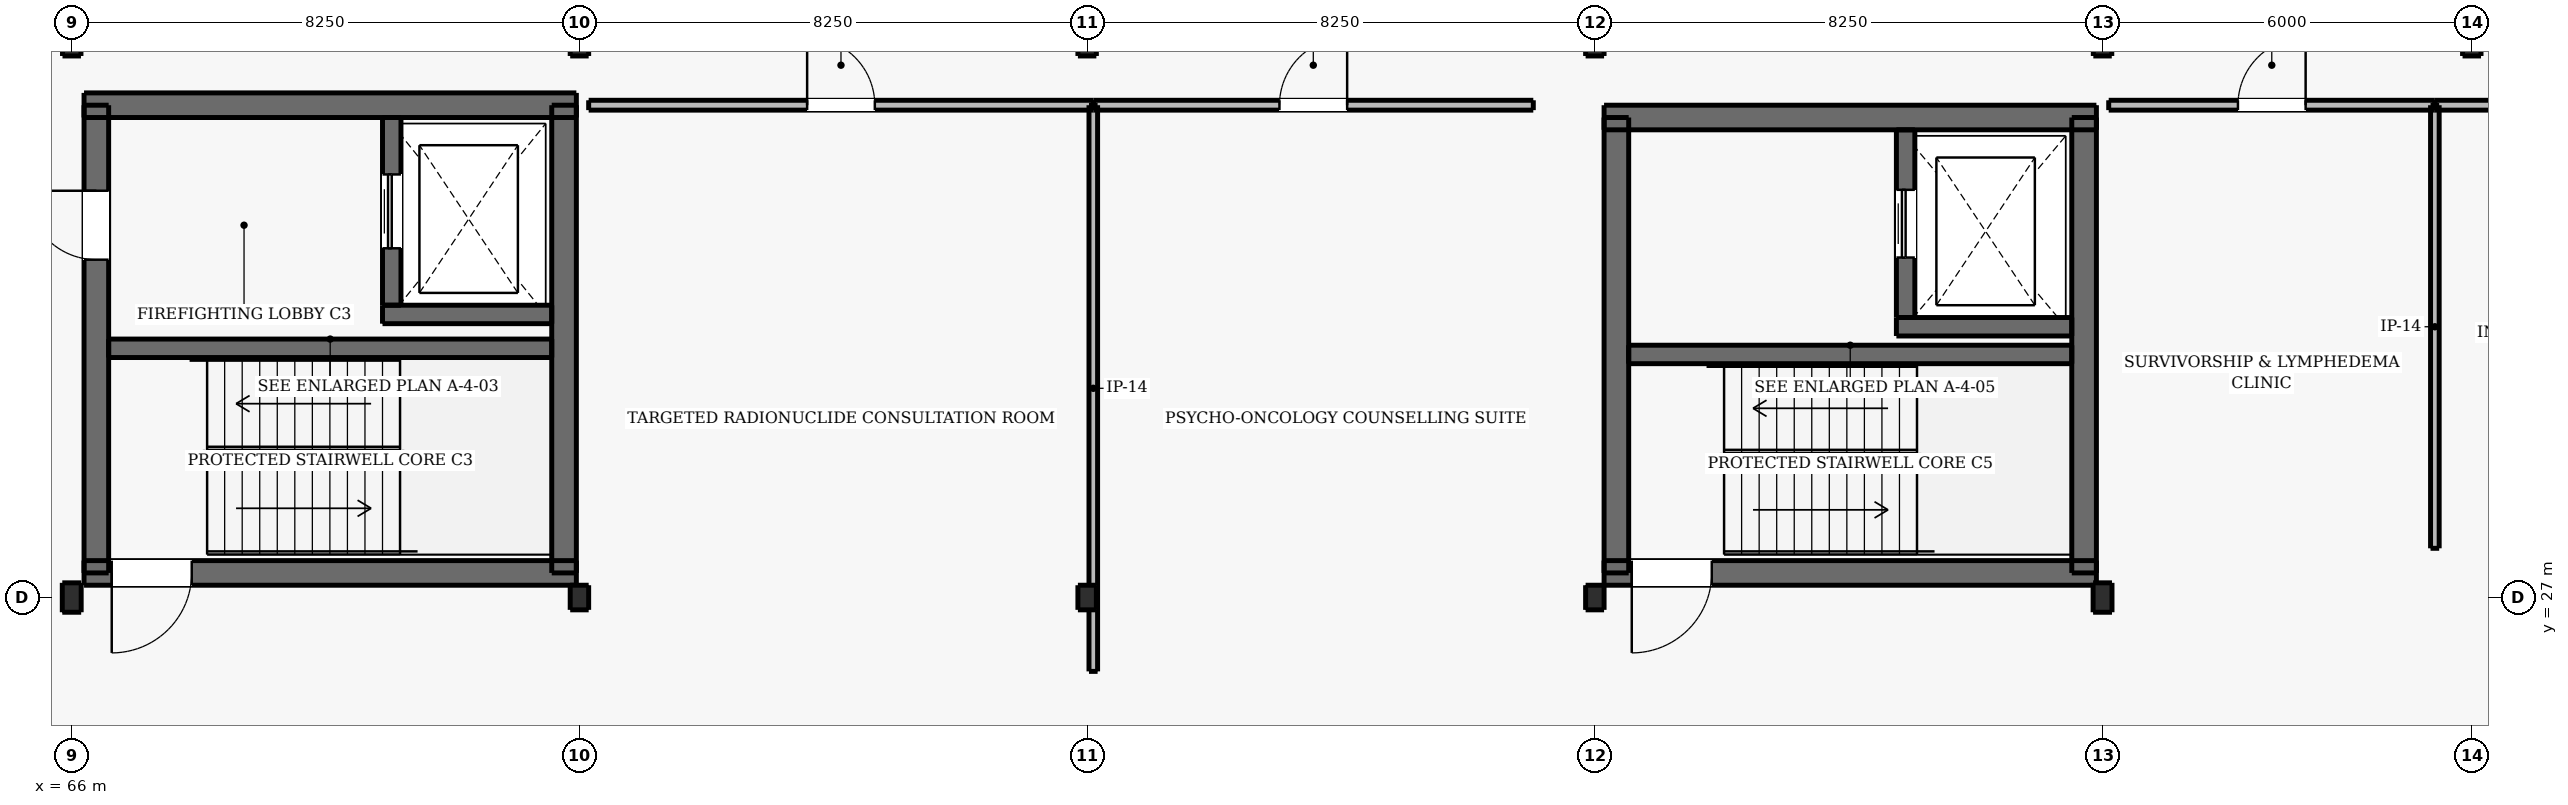
"""IFC4 building model, lengths in metres.
Left out: names, types, materials, properties, quantities, classifications, styles, units other than length and angle.
Written with IfcOpenShell. Run it as: python <this file> out.ifc"""

import sys

from ifc_helpers import new_model, si_unit, direction, frame, frame_2d, origin, origin_2d, place, context, subcontext, project, spatial, rectangle, i_section, extrude, element, fill, save


model = new_model("IFC4")
c1 = context("Model", 3, precision=1e-05, world=origin(), true_north=direction((0.0, 1.0)))
c2 = subcontext(c1, "Body", "Model", "MODEL_VIEW")
j1 = project(units=[si_unit("LENGTHUNIT", "METRE"), si_unit("PLANEANGLEUNIT", "RADIAN")], contexts=[c1])
p1 = place(None, origin())
s1 = spatial("IfcSite", under=j1, at=p1, CompositionType="ELEMENT")
p2 = place(p1, origin())
s2 = spatial("IfcBuilding", under=s1, at=p2, CompositionType="ELEMENT")
p3 = place(p2, frame((0.0, 0.0, 9.6)))
s3 = spatial("IfcBuildingStorey", under=s2, at=p3, CompositionType="ELEMENT", Elevation=9.6)
p4 = place(p3, frame((66.0, 27.0, 0.0), z_axis=(0.0, 0.0, 1.0), x_axis=(1.0, 0.0, 0.0)))
e1 = element("IfcColumn", 1, at=p4, inside=s3, PredefinedType="COLUMN", context=c2, shape_type="SweptSolid", body=[
    extrude(i_section(OverallWidth=0.307, OverallDepth=0.478, WebThickness=0.021, FlangeThickness=0.04, FilletRadius=0.027, at=origin_2d()), origin(), (0.0, 0.0, 1.0), 4.2),
])
for number, where, z_axis, x_axis in (
    (2, (66.0, 36.0, 0.0), (0.0, 0.0, 1.0), (1.0, 0.0, 0.0)),
    (3, (74.25, 27.0, 0.0), (0.0, 0.0, 1.0), (1.0, 0.0, 0.0)),
    (4, (74.25, 36.0, 0.0), (0.0, 0.0, 1.0), (1.0, 0.0, 0.0)),
    (5, (82.5, 27.0, 0.0), (0.0, 0.0, 1.0), (1.0, 0.0, 0.0)),
    (6, (82.5, 36.0, 0.0), (0.0, 0.0, 1.0), (1.0, 0.0, 0.0)),
    (7, (90.75, 27.0, 0.0), (0.0, 0.0, 1.0), (1.0, 0.0, 0.0)),
    (8, (90.75, 36.0, 0.0), (0.0, 0.0, 1.0), (1.0, 0.0, 0.0)),
):
    element("IfcColumn", number, at=place(p3, frame(where, z_axis=z_axis, x_axis=x_axis)), inside=s3, PredefinedType="COLUMN", context=c2, shape_type="SweptSolid", body=[
        extrude(i_section(OverallWidth=0.3, OverallDepth=0.4, WebThickness=0.013, FlangeThickness=0.024, FilletRadius=0.027, at=origin_2d()), origin(), (0.0, 0.0, 1.0), 4.2),
    ])
p5 = place(p3, frame((99.0, 27.0, 0.0), z_axis=(0.0, 0.0, 1.0), x_axis=(1.0, 0.0, 0.0)))
e9 = element("IfcColumn", 9, at=p5, inside=s3, PredefinedType="COLUMN", context=c2, shape_type="SweptSolid", body=[
    extrude(i_section(OverallWidth=0.307, OverallDepth=0.478, WebThickness=0.021, FlangeThickness=0.04, FilletRadius=0.027, at=origin_2d()), origin(), (0.0, 0.0, 1.0), 4.2),
])
for number, where, z_axis, x_axis in (
    (10, (99.0, 36.0, 0.0), (0.0, 0.0, 1.0), (1.0, 0.0, 0.0)),
    (11, (105.0, 36.0, 0.0), (0.0, 0.0, 1.0), (1.0, 0.0, 0.0)),
):
    element("IfcColumn", number, at=place(p3, frame(where, z_axis=z_axis, x_axis=x_axis)), inside=s3, PredefinedType="COLUMN", context=c2, shape_type="SweptSolid", body=[
        extrude(i_section(OverallWidth=0.3, OverallDepth=0.4, WebThickness=0.013, FlangeThickness=0.024, FilletRadius=0.027, at=origin_2d()), origin(), (0.0, 0.0, 1.0), 4.2),
    ])
p6 = place(p3, frame((66.2, 27.4, 0.0), z_axis=(0.0, 0.0, 1.0), x_axis=(1.0, 0.0, 0.0)))
e12 = element("IfcWall", 12, at=p6, inside=s3, PredefinedType="SHEAR", context=c2, shape_type="SweptSolid", body=[
    extrude(rectangle(XDim=8.0, YDim=0.4, at=frame_2d((4.0, 0.0))), origin(), (0.0, 0.0, 1.0), 4.2),
])
p7 = place(p6, frame((0.45, 0.0, 0.0)))
e13 = element("IfcOpeningElement", 13, at=p7, cuts=e12, PredefinedType="OPENING", context=c2, shape_type="SweptSolid", body=[
    extrude(rectangle(XDim=1.3, YDim=2.15, at=frame_2d((0.65, 1.075))), frame((0.0, 0.21, 0.0), z_axis=(0.0, -1.0, 0.0), x_axis=(1.0, 0.0, 0.0)), (0.0, 0.0, 1.0), 0.42),
])
p8 = place(p3, frame((66.2, 35.0, 0.0), z_axis=(0.0, 0.0, 1.0), x_axis=(1.0, 0.0, 0.0)))
e14 = element("IfcWall", 14, at=p8, inside=s3, PredefinedType="SHEAR", context=c2, shape_type="SweptSolid", body=[
    extrude(rectangle(XDim=8.0, YDim=0.4, at=frame_2d((4.0, 0.0))), origin(), (0.0, 0.0, 1.0), 4.2),
])
p9 = place(p3, frame((66.4, 27.4, 0.0), z_axis=(0.0, 0.0, 1.0), x_axis=(0.0, 1.0, 0.0)))
e15 = element("IfcWall", 15, at=p9, inside=s3, PredefinedType="SHEAR", context=c2, shape_type="SweptSolid", body=[
    extrude(rectangle(XDim=7.6, YDim=0.4, at=frame_2d((3.8, 0.0))), origin(), (0.0, 0.0, 1.0), 4.2),
])
p10 = place(p9, frame((5.09, 0.0, 0.0)))
e16 = element("IfcOpeningElement", 16, at=p10, cuts=e15, PredefinedType="OPENING", context=c2, shape_type="SweptSolid", body=[
    extrude(rectangle(XDim=1.12, YDim=2.15, at=frame_2d((0.56, 1.075))), frame((0.0, 0.21, 0.0), z_axis=(0.0, -1.0, 0.0), x_axis=(1.0, 0.0, 0.0)), (0.0, 0.0, 1.0), 0.42),
])
p11 = place(p3, frame((74.0, 27.4, 0.0), z_axis=(0.0, 0.0, 1.0), x_axis=(0.0, 1.0, 0.0)))
e17 = element("IfcWall", 17, at=p11, inside=s3, PredefinedType="SHEAR", context=c2, shape_type="SweptSolid", body=[
    extrude(rectangle(XDim=7.6, YDim=0.4, at=frame_2d((3.8, 0.0))), origin(), (0.0, 0.0, 1.0), 4.2),
])
p12 = place(p3, frame((66.6, 31.05, 0.0), z_axis=(0.0, 0.0, 1.0), x_axis=(1.0, 0.0, 0.0)))
e18 = element("IfcWall", 18, at=p12, inside=s3, PredefinedType="SHEAR", context=c2, shape_type="SweptSolid", body=[
    extrude(rectangle(XDim=7.2, YDim=0.3, at=frame_2d((3.6, 0.0))), origin(), (0.0, 0.0, 1.0), 4.2),
])
p13 = place(p3, frame((71.05, 31.6, 0.0), z_axis=(0.0, 0.0, 1.0), x_axis=(1.0, 0.0, 0.0)))
e19 = element("IfcWall", 19, at=p13, inside=s3, PredefinedType="SHEAR", context=c2, shape_type="SweptSolid", body=[
    extrude(rectangle(XDim=2.75, YDim=0.3, at=frame_2d((1.375, 0.0))), origin(), (0.0, 0.0, 1.0), 4.2),
])
p14 = place(p3, frame((71.2, 31.75, 0.0), z_axis=(0.0, 0.0, 1.0), x_axis=(0.0, 1.0, 0.0)))
e20 = element("IfcWall", 20, at=p14, inside=s3, PredefinedType="SHEAR", context=c2, shape_type="SweptSolid", body=[
    extrude(rectangle(XDim=3.05, YDim=0.3, at=frame_2d((1.525, 0.0))), origin(), (0.0, 0.0, 1.0), 4.2),
])
p15 = place(p14, frame((0.925, 0.0, 0.0)))
e21 = element("IfcOpeningElement", 21, at=p15, cuts=e20, PredefinedType="OPENING", context=c2, shape_type="SweptSolid", body=[
    extrude(rectangle(XDim=1.2, YDim=2.15, at=frame_2d((0.6, 1.075))), frame((0.0, 0.16, 0.0), z_axis=(0.0, -1.0, 0.0), x_axis=(1.0, 0.0, 0.0)), (0.0, 0.0, 1.0), 0.32),
])
p16 = place(p3, frame((90.9, 27.4, 0.0), z_axis=(0.0, 0.0, 1.0), x_axis=(1.0, 0.0, 0.0)))
e22 = element("IfcWall", 22, at=p16, inside=s3, PredefinedType="SHEAR", context=c2, shape_type="SweptSolid", body=[
    extrude(rectangle(XDim=8.0, YDim=0.4, at=frame_2d((4.0, 0.0))), origin(), (0.0, 0.0, 1.0), 4.2),
])
p17 = place(p16, frame((0.45, 0.0, 0.0)))
e23 = element("IfcOpeningElement", 23, at=p17, cuts=e22, PredefinedType="OPENING", context=c2, shape_type="SweptSolid", body=[
    extrude(rectangle(XDim=1.3, YDim=2.15, at=frame_2d((0.65, 1.075))), frame((0.0, 0.21, 0.0), z_axis=(0.0, -1.0, 0.0), x_axis=(1.0, 0.0, 0.0)), (0.0, 0.0, 1.0), 0.42),
])
p18 = place(p3, frame((90.9, 34.8, 0.0), z_axis=(0.0, 0.0, 1.0), x_axis=(1.0, 0.0, 0.0)))
e24 = element("IfcWall", 24, at=p18, inside=s3, PredefinedType="SHEAR", context=c2, shape_type="SweptSolid", body=[
    extrude(rectangle(XDim=8.0, YDim=0.4, at=frame_2d((4.0, 0.0))), origin(), (0.0, 0.0, 1.0), 4.2),
])
for number, where, z_axis, x_axis in (
    (25, (91.1, 27.4, 0.0), (0.0, 0.0, 1.0), (0.0, 1.0, 0.0)),
    (26, (98.7, 27.4, 0.0), (0.0, 0.0, 1.0), (0.0, 1.0, 0.0)),
):
    element("IfcWall", number, at=place(p3, frame(where, z_axis=z_axis, x_axis=x_axis)), inside=s3, PredefinedType="SHEAR", context=c2, shape_type="SweptSolid", body=[
        extrude(rectangle(XDim=7.4, YDim=0.4, at=frame_2d((3.7, 0.0))), origin(), (0.0, 0.0, 1.0), 4.2),
    ])
p19 = place(p3, frame((91.3, 30.95, 0.0), z_axis=(0.0, 0.0, 1.0), x_axis=(1.0, 0.0, 0.0)))
e27 = element("IfcWall", 27, at=p19, inside=s3, PredefinedType="SHEAR", context=c2, shape_type="SweptSolid", body=[
    extrude(rectangle(XDim=7.2, YDim=0.3, at=frame_2d((3.6, 0.0))), origin(), (0.0, 0.0, 1.0), 4.2),
])
p20 = place(p3, frame((95.65, 31.4, 0.0), z_axis=(0.0, 0.0, 1.0), x_axis=(1.0, 0.0, 0.0)))
e28 = element("IfcWall", 28, at=p20, inside=s3, PredefinedType="SHEAR", context=c2, shape_type="SweptSolid", body=[
    extrude(rectangle(XDim=2.85, YDim=0.3, at=frame_2d((1.425, 0.0))), origin(), (0.0, 0.0, 1.0), 4.2),
])
p21 = place(p3, frame((95.8, 31.55, 0.0), z_axis=(0.0, 0.0, 1.0), x_axis=(0.0, 1.0, 0.0)))
e29 = element("IfcWall", 29, at=p21, inside=s3, PredefinedType="SHEAR", context=c2, shape_type="SweptSolid", body=[
    extrude(rectangle(XDim=3.05, YDim=0.3, at=frame_2d((1.525, 0.0))), origin(), (0.0, 0.0, 1.0), 4.2),
])
p22 = place(p21, frame((0.975, 0.0, 0.0)))
e30 = element("IfcOpeningElement", 30, at=p22, cuts=e29, PredefinedType="OPENING", context=c2, shape_type="SweptSolid", body=[
    extrude(rectangle(XDim=1.1, YDim=2.15, at=frame_2d((0.55, 1.075))), frame((0.0, 0.16, 0.0), z_axis=(0.0, -1.0, 0.0), x_axis=(1.0, 0.0, 0.0)), (0.0, 0.0, 1.0), 0.32),
])
p23 = place(p3, frame((99.1, 35.0, 0.0), z_axis=(0.0, 0.0, 1.0), x_axis=(1.0, 0.0, 0.0)))
e31 = element("IfcWall", 31, at=p23, inside=s3, PredefinedType="PARTITIONING", context=c2, shape_type="SweptSolid", body=[
    extrude(rectangle(XDim=5.3, YDim=0.16, at=frame_2d((2.65, 0.0))), origin(), (0.0, 0.0, 1.0), 3.93),
])
p24 = place(p23, frame((2.1, 0.0, 0.0)))
e32 = element("IfcOpeningElement", 32, at=p24, cuts=e31, PredefinedType="OPENING", context=c2, shape_type="SweptSolid", body=[
    extrude(rectangle(XDim=1.1, YDim=2.15, at=frame_2d((0.55, 1.075))), frame((0.0, 0.09, 0.0), z_axis=(0.0, -1.0, 0.0), x_axis=(1.0, 0.0, 0.0)), (0.0, 0.0, 1.0), 0.18),
])
p25 = place(p3, frame((104.4, 27.8, 0.0), z_axis=(0.0, 0.0, 1.0), x_axis=(0.0, 1.0, 0.0)))
e33 = element("IfcWall", 33, at=p25, inside=s3, PredefinedType="PARTITIONING", context=c2, shape_type="SweptSolid", body=[
    extrude(rectangle(XDim=7.2, YDim=0.14, at=frame_2d((3.6, 0.0))), origin(), (0.0, 0.0, 1.0), 3.93),
])
p26 = place(p3, frame((104.4, 35.0, 0.0), z_axis=(0.0, 0.0, 1.0), x_axis=(1.0, 0.0, 0.0)))
e34 = element("IfcWall", 34, at=p26, inside=s3, PredefinedType="PARTITIONING", context=c2, shape_type="SweptSolid", body=[
    extrude(rectangle(XDim=12.4, YDim=0.16, at=frame_2d((6.2, 0.0))), origin(), (0.0, 0.0, 1.0), 3.93),
])
p27 = place(p26, frame((4.81, 0.0, 0.0)))
e35 = element("IfcOpeningElement", 35, at=p27, cuts=e34, PredefinedType="OPENING", context=c2, shape_type="SweptSolid", body=[
    extrude(rectangle(XDim=1.1, YDim=2.15, at=frame_2d((0.55, 1.075))), frame((0.0, 0.09, 0.0), z_axis=(0.0, -1.0, 0.0), x_axis=(1.0, 0.0, 0.0)), (0.0, 0.0, 1.0), 0.18),
])
p28 = place(p3, frame((74.4, 35.0, 0.0), z_axis=(0.0, 0.0, 1.0), x_axis=(1.0, 0.0, 0.0)))
e36 = element("IfcWall", 36, at=p28, inside=s3, PredefinedType="PARTITIONING", context=c2, shape_type="SweptSolid", body=[
    extrude(rectangle(XDim=8.2, YDim=0.16, at=frame_2d((4.1, 0.0))), origin(), (0.0, 0.0, 1.0), 3.93),
])
p29 = place(p28, frame((3.55, 0.0, 0.0)))
e37 = element("IfcOpeningElement", 37, at=p29, cuts=e36, PredefinedType="OPENING", context=c2, shape_type="SweptSolid", body=[
    extrude(rectangle(XDim=1.1, YDim=2.15, at=frame_2d((0.55, 1.075))), frame((0.0, 0.09, 0.0), z_axis=(0.0, -1.0, 0.0), x_axis=(1.0, 0.0, 0.0)), (0.0, 0.0, 1.0), 0.18),
])
p30 = place(p3, frame((82.6, 25.8, 0.0), z_axis=(0.0, 0.0, 1.0), x_axis=(0.0, 1.0, 0.0)))
e38 = element("IfcWall", 38, at=p30, inside=s3, PredefinedType="PARTITIONING", context=c2, shape_type="SweptSolid", body=[
    extrude(rectangle(XDim=9.2, YDim=0.14, at=frame_2d((4.6, 0.0))), origin(), (0.0, 0.0, 1.0), 3.53),
])
p31 = place(p3, frame((82.6, 35.0, 0.0), z_axis=(0.0, 0.0, 1.0), x_axis=(1.0, 0.0, 0.0)))
e39 = element("IfcWall", 39, at=p31, inside=s3, PredefinedType="PARTITIONING", context=c2, shape_type="SweptSolid", body=[
    extrude(rectangle(XDim=7.15, YDim=0.16, at=frame_2d((3.575, 0.0))), origin(), (0.0, 0.0, 1.0), 3.93),
])
p32 = place(p31, frame((3.025, 0.0, 0.0)))
e40 = element("IfcOpeningElement", 40, at=p32, cuts=e39, PredefinedType="OPENING", context=c2, shape_type="SweptSolid", body=[
    extrude(rectangle(XDim=1.1, YDim=2.15, at=frame_2d((0.55, 1.075))), frame((0.0, 0.09, 0.0), z_axis=(0.0, -1.0, 0.0), x_axis=(1.0, 0.0, 0.0)), (0.0, 0.0, 1.0), 0.18),
])
p33 = place(p15, origin())
e41 = element("IfcDoor", 41, at=p33, inside=s3, OperationType="DOUBLE_DOOR_SLIDING", PredefinedType="DOOR", context=c2, shape_type="SweptSolid", body=[
    extrude(rectangle(XDim=1.2, YDim=2.15, at=frame_2d((0.6, 1.075))), frame((0.0, 0.025, 0.0), z_axis=(0.0, -1.0, 0.0), x_axis=(1.0, 0.0, 0.0)), (0.0, 0.0, 1.0), 0.05),
])
fill(e21, e41)
p34 = place(p10, origin())
e42 = element("IfcDoor", 42, at=p34, inside=s3, OperationType="SINGLE_SWING_RIGHT", PredefinedType="DOOR", context=c2, shape_type="SweptSolid", body=[
    extrude(rectangle(XDim=1.12, YDim=2.15, at=frame_2d((0.56, 1.075))), frame((0.0, 0.025, 0.0), z_axis=(0.0, -1.0, 0.0), x_axis=(1.0, 0.0, 0.0)), (0.0, 0.0, 1.0), 0.05),
])
fill(e16, e42)
p35 = place(p7, frame((1.3, 0.0, 0.0), z_axis=(0.0, 0.0, 1.0), x_axis=(-1.0, 0.0, 0.0)))
e43 = element("IfcDoor", 43, at=p35, inside=s3, OperationType="SINGLE_SWING_LEFT", PredefinedType="DOOR", context=c2, shape_type="SweptSolid", body=[
    extrude(rectangle(XDim=1.3, YDim=2.15, at=frame_2d((0.65, 1.075))), frame((0.0, 0.025, 0.0), z_axis=(0.0, -1.0, 0.0), x_axis=(1.0, 0.0, 0.0)), (0.0, 0.0, 1.0), 0.05),
])
fill(e13, e43)
p36 = place(p22, origin())
e44 = element("IfcDoor", 44, at=p36, inside=s3, OperationType="DOUBLE_DOOR_SLIDING", PredefinedType="DOOR", context=c2, shape_type="SweptSolid", body=[
    extrude(rectangle(XDim=1.1, YDim=2.15, at=frame_2d((0.55, 1.075))), frame((0.0, 0.025, 0.0), z_axis=(0.0, -1.0, 0.0), x_axis=(1.0, 0.0, 0.0)), (0.0, 0.0, 1.0), 0.05),
])
fill(e30, e44)
p37 = place(p17, frame((1.3, 0.0, 0.0), z_axis=(0.0, 0.0, 1.0), x_axis=(-1.0, 0.0, 0.0)))
e45 = element("IfcDoor", 45, at=p37, inside=s3, OperationType="SINGLE_SWING_LEFT", PredefinedType="DOOR", context=c2, shape_type="SweptSolid", body=[
    extrude(rectangle(XDim=1.3, YDim=2.15, at=frame_2d((0.65, 1.075))), frame((0.0, 0.025, 0.0), z_axis=(0.0, -1.0, 0.0), x_axis=(1.0, 0.0, 0.0)), (0.0, 0.0, 1.0), 0.05),
])
fill(e23, e45)
p38 = place(p24, origin())
e46 = element("IfcDoor", 46, at=p38, inside=s3, OperationType="SINGLE_SWING_RIGHT", PredefinedType="DOOR", context=c2, shape_type="SweptSolid", body=[
    extrude(rectangle(XDim=1.1, YDim=2.15, at=frame_2d((0.55, 1.075))), frame((0.0, 0.025, 0.0), z_axis=(0.0, -1.0, 0.0), x_axis=(1.0, 0.0, 0.0)), (0.0, 0.0, 1.0), 0.05),
])
fill(e32, e46)
p39 = place(p29, origin())
e47 = element("IfcDoor", 47, at=p39, inside=s3, OperationType="SINGLE_SWING_LEFT", PredefinedType="DOOR", context=c2, shape_type="SweptSolid", body=[
    extrude(rectangle(XDim=1.1, YDim=2.15, at=frame_2d((0.55, 1.075))), frame((0.0, 0.025, 0.0), z_axis=(0.0, -1.0, 0.0), x_axis=(1.0, 0.0, 0.0)), (0.0, 0.0, 1.0), 0.05),
])
fill(e37, e47)
p40 = place(p32, origin())
e48 = element("IfcDoor", 48, at=p40, inside=s3, OperationType="SINGLE_SWING_RIGHT", PredefinedType="DOOR", context=c2, shape_type="SweptSolid", body=[
    extrude(rectangle(XDim=1.1, YDim=2.15, at=frame_2d((0.55, 1.075))), frame((0.0, 0.025, 0.0), z_axis=(0.0, -1.0, 0.0), x_axis=(1.0, 0.0, 0.0)), (0.0, 0.0, 1.0), 0.05),
])
fill(e40, e48)
save(model, sys.argv[1])
